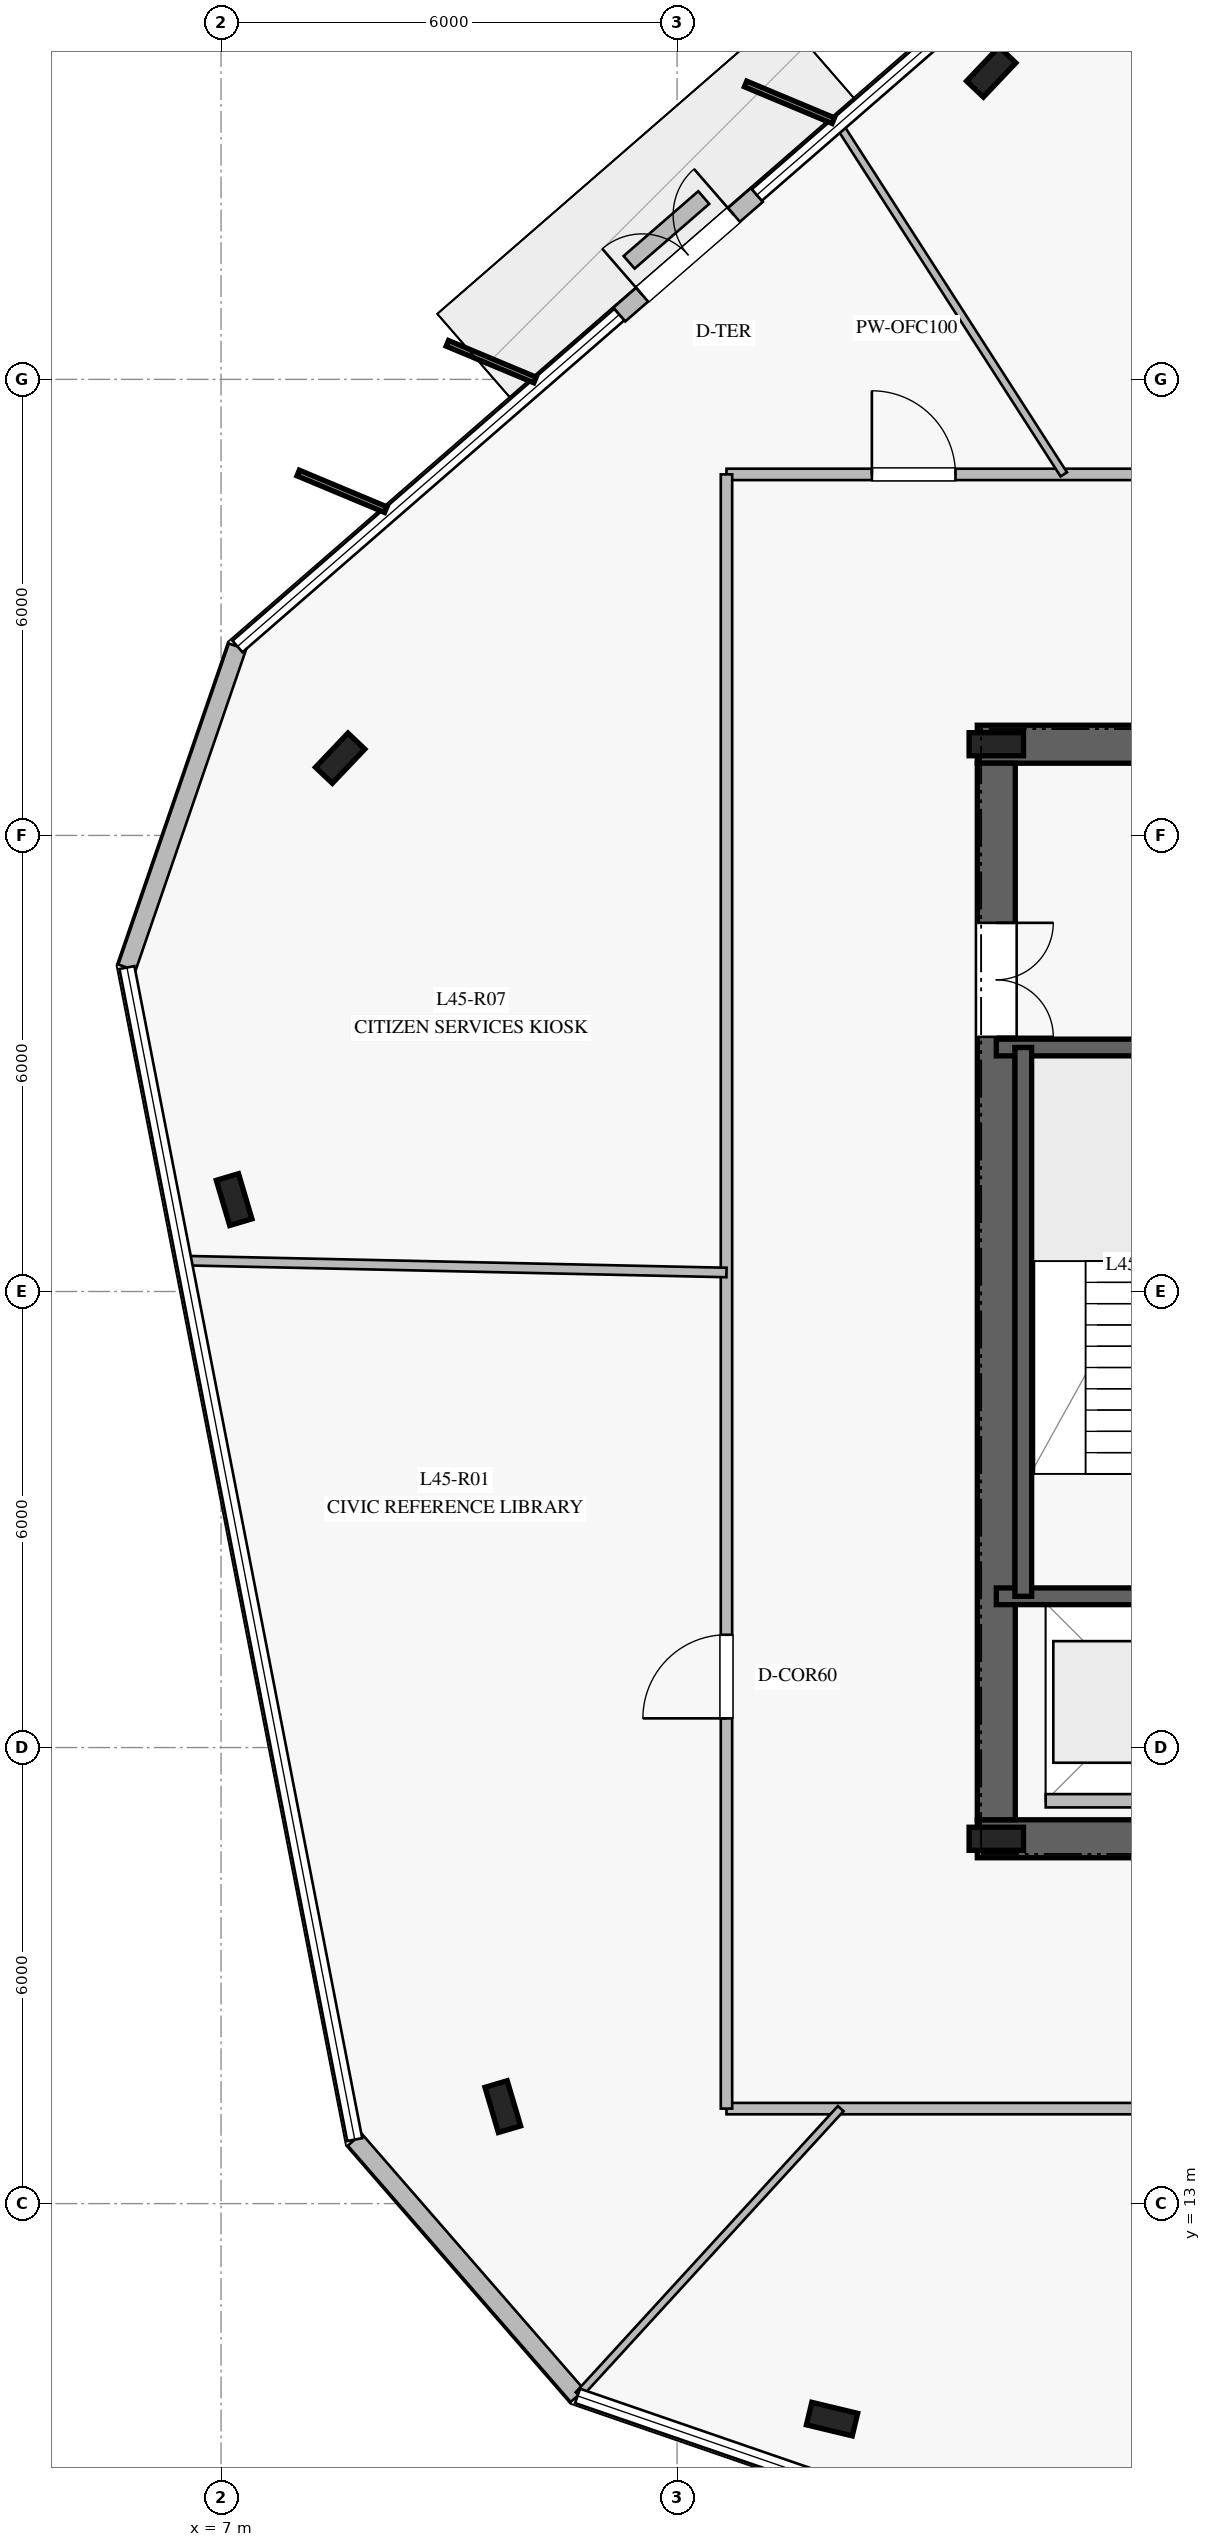
"""IFC4 building model, lengths in metres.
Left out: names, types, materials, properties, quantities, classifications, styles, units other than length and angle.
Written with IfcOpenShell. Run it as: python <this file> out.ifc"""

import sys

from ifc_helpers import new_model, si_unit, direction, frame, frame_2d, origin, origin_2d, place, context, subcontext, project, spatial, rectangle, i_section, extrude, element, fill, save


model = new_model("IFC4")
c1 = context("Model", 3, precision=1e-05, world=origin(), true_north=direction((0.0, 1.0)))
c2 = subcontext(c1, "Body", "Model", "MODEL_VIEW")
j1 = project(units=[si_unit("LENGTHUNIT", "METRE"), si_unit("PLANEANGLEUNIT", "RADIAN")], contexts=[c1])
p1 = place(None, origin())
s1 = spatial("IfcSite", under=j1, at=p1, CompositionType="ELEMENT")
p2 = place(p1, origin())
s2 = spatial("IfcBuilding", under=s1, at=p2, CompositionType="ELEMENT")
p3 = place(p2, frame((0.0, 0.0, 188.8)))
s3 = spatial("IfcBuildingStorey", under=s2, at=p3, CompositionType="ELEMENT", Elevation=188.8)
p4 = place(p3, frame((16.95, 17.8, 0.0), z_axis=(0.0, 0.0, 1.0), x_axis=(1.0, 0.0, 0.0)))
e1 = element("IfcWall", 1, at=p4, inside=s3, PredefinedType="SHEAR", context=c2, shape_type="SweptSolid", body=[
    extrude(rectangle(XDim=16.1, YDim=0.5, at=frame_2d((8.05, 0.0))), origin(), (0.0, 0.0, 1.0), 3.78),
])
p5 = place(p4, frame((5.0, 0.0, 0.0)))
e2 = element("IfcOpeningElement", 2, at=p5, cuts=e1, PredefinedType="OPENING", context=c2, shape_type="SweptSolid", body=[
    extrude(rectangle(XDim=1.2, YDim=2.25, at=frame_2d((0.6, 1.125))), frame((0.0, 0.26, 0.0), z_axis=(0.0, -1.0, 0.0), x_axis=(1.0, 0.0, 0.0)), (0.0, 0.0, 1.0), 0.52),
])
p6 = place(p4, frame((10.9, 0.0, 0.0)))
e3 = element("IfcOpeningElement", 3, at=p6, cuts=e1, PredefinedType="OPENING", context=c2, shape_type="SweptSolid", body=[
    extrude(rectangle(XDim=1.1, YDim=2.2, at=frame_2d((0.55, 1.1))), frame((0.0, 0.26, 0.0), z_axis=(0.0, -1.0, 0.0), x_axis=(1.0, 0.0, 0.0)), (0.0, 0.0, 1.0), 0.52),
])
p7 = place(p3, frame((33.05, 32.2, 0.0), z_axis=(0.0, 0.0, 1.0), x_axis=(-1.0, 0.0, 0.0)))
e4 = element("IfcWall", 4, at=p7, inside=s3, PredefinedType="SHEAR", context=c2, shape_type="SweptSolid", body=[
    extrude(rectangle(XDim=16.1, YDim=0.5, at=frame_2d((8.05, 0.0))), origin(), (0.0, 0.0, 1.0), 3.78),
])
p8 = place(p7, frame((5.0, 0.0, 0.0)))
e5 = element("IfcOpeningElement", 5, at=p8, cuts=e4, PredefinedType="OPENING", context=c2, shape_type="SweptSolid", body=[
    extrude(rectangle(XDim=1.2, YDim=2.25, at=frame_2d((0.6, 1.125))), frame((0.0, 0.26, 0.0), z_axis=(0.0, -1.0, 0.0), x_axis=(1.0, 0.0, 0.0)), (0.0, 0.0, 1.0), 0.52),
])
p9 = place(p7, frame((9.825, 0.0, 0.0)))
e6 = element("IfcOpeningElement", 6, at=p9, cuts=e4, PredefinedType="OPENING", context=c2, shape_type="SweptSolid", body=[
    extrude(rectangle(XDim=1.1, YDim=2.2, at=frame_2d((0.55, 1.1))), frame((0.0, 0.26, 0.0), z_axis=(0.0, -1.0, 0.0), x_axis=(1.0, 0.0, 0.0)), (0.0, 0.0, 1.0), 0.52),
])
p10 = place(p3, frame((17.2, 31.95, 0.0), z_axis=(0.0, 0.0, 1.0), x_axis=(0.0, -1.0, 0.0)))
e7 = element("IfcWall", 7, at=p10, inside=s3, PredefinedType="SHEAR", context=c2, shape_type="SweptSolid", body=[
    extrude(rectangle(XDim=13.9, YDim=0.5, at=frame_2d((6.95, 0.0))), origin(), (0.0, 0.0, 1.0), 3.78),
])
p11 = place(p10, frame((2.1, 0.0, 0.0)))
e8 = element("IfcOpeningElement", 8, at=p11, cuts=e7, PredefinedType="OPENING", context=c2, shape_type="SweptSolid", body=[
    extrude(rectangle(XDim=1.5, YDim=2.2, at=frame_2d((0.75, 1.1))), frame((0.0, 0.26, 0.0), z_axis=(0.0, -1.0, 0.0), x_axis=(1.0, 0.0, 0.0)), (0.0, 0.0, 1.0), 0.52),
])
for number, where, z_axis, x_axis in (
    (9, (17.2, 17.8, 0.0), (0.0, 0.0, 1.0), (1.0, 0.0, 0.0)),
    (10, (17.2, 32.2, 0.0), (0.0, 0.0, 1.0), (1.0, 0.0, 0.0)),
):
    element("IfcColumn", number, at=place(p3, frame(where, z_axis=z_axis, x_axis=x_axis)), inside=s3, PredefinedType="COLUMN", context=c2, shape_type="SweptSolid", body=[
        extrude(i_section(OverallWidth=0.304, OverallDepth=0.716, WebThickness=0.021, FlangeThickness=0.04, at=origin_2d()), origin(), (0.0, 0.0, 1.0), 4.0),
    ])
for number, where, z_axis, x_axis in (
    (11, (17.2, 20.99, 0.0), (0.0, 0.0, 1.0), (1.0, 0.0, 0.0)),
    (12, (17.2, 28.21, 0.0), (0.0, 0.0, 1.0), (1.0, 0.0, 0.0)),
):
    element("IfcWall", number, at=place(p3, frame(where, z_axis=z_axis, x_axis=x_axis)), inside=s3, PredefinedType="SOLIDWALL", context=c2, shape_type="SweptSolid", body=[
        extrude(rectangle(XDim=3.72, YDim=0.22, at=frame_2d((1.86, 0.0))), origin(), (0.0, 0.0, 1.0), 3.78),
    ])
p12 = place(p3, frame((17.555, 28.21, 0.0), z_axis=(0.0, 0.0, 1.0), x_axis=(0.0, -1.0, 0.0)))
e13 = element("IfcWall", 13, at=p12, inside=s3, PredefinedType="SOLIDWALL", context=c2, shape_type="SweptSolid", body=[
    extrude(rectangle(XDim=7.22, YDim=0.22, at=frame_2d((3.61, 0.0))), origin(), (0.0, 0.0, 1.0), 3.78),
])
for number, where, z_axis, x_axis in (
    (14, (17.133, 41.044, 0.0), (0.0, 0.0, 1.0), (0.688, 0.725, 0.0)),
    (15, (8.567, 32.016, 0.0), (0.0, 0.0, 1.0), (0.688, 0.725, 0.0)),
    (16, (7.172, 26.209, 0.0), (0.0, 0.0, 1.0), (-0.284, 0.959, 0.0)),
    (17, (10.707, 14.276, 0.0), (0.0, 0.0, 1.0), (-0.284, 0.959, 0.0)),
    (18, (15.039, 10.165, 0.0), (0.0, 0.0, 1.0), (-0.972, 0.233, 0.0)),
):
    element("IfcColumn", number, at=place(p3, frame(where, z_axis=z_axis, x_axis=x_axis)), inside=s3, PredefinedType="COLUMN", context=c2, shape_type="SweptSolid", body=[
        extrude(i_section(OverallWidth=0.305, OverallDepth=0.62, WebThickness=0.021, FlangeThickness=0.04, at=origin_2d()), origin(), (0.0, 0.0, 1.0), 4.0),
    ])
p13 = place(p3, frame((14.05, 39.426, 0.0), z_axis=(0.0, 0.0, 1.0), x_axis=(-0.754778546913, -0.655979683466, 0.0)))
e19 = element("IfcWall", 19, at=p13, inside=s3, PredefinedType="STANDARD", context=c2, shape_type="SweptSolid", body=[
    extrude(rectangle(XDim=2.399, YDim=0.24, at=frame_2d((1.2, 0.0))), origin(), (0.0, 0.0, 1.0), 3.78),
])
p14 = place(p13, frame((0.4, 0.0, 0.0)))
e20 = element("IfcOpeningElement", 20, at=p14, cuts=e19, PredefinedType="OPENING", context=c2, shape_type="SweptSolid", body=[
    extrude(rectangle(XDim=1.6, YDim=2.25, at=frame_2d((0.8, 1.125))), frame((0.0, 0.13, 0.0), z_axis=(0.0, -1.0, 0.0), x_axis=(1.0, 0.0, 0.0)), (0.0, 0.0, 1.0), 0.26),
])
p15 = place(p3, frame((7.216, 33.486, 0.0), z_axis=(0.0, 0.0, 1.0), x_axis=(-0.325492114227, -0.94554475493, 0.0)))
e21 = element("IfcWall", 21, at=p15, inside=s3, PredefinedType="STANDARD", context=c2, shape_type="SweptSolid", body=[
    extrude(rectangle(XDim=4.467, YDim=0.24, at=frame_2d((2.234, 0.0))), origin(), (0.0, 0.0, 1.0), 3.78),
])
p16 = place(p3, frame((8.759, 13.842, 0.0), z_axis=(0.0, 0.0, 1.0), x_axis=(0.656134075049, -0.754644337128, 0.0)))
e22 = element("IfcWall", 22, at=p16, inside=s3, PredefinedType="STANDARD", context=c2, shape_type="SweptSolid", body=[
    extrude(rectangle(XDim=4.469, YDim=0.24, at=frame_2d((2.234, 0.0))), origin(), (0.0, 0.0, 1.0), 3.78),
])
p17 = place(p3, frame((13.351, 39.392, 0.0), z_axis=(0.0, 0.0, 1.0), x_axis=(-0.75537303729, -0.655295028621, 0.0)))
e23 = element("IfcWall", 23, at=p17, inside=s3, PredefinedType="USERDEFINED", context=c2, shape_type="SweptSolid", body=[
    extrude(rectangle(XDim=1.3, YDim=0.22, at=frame_2d((0.65, 0.0))), origin(), (0.0, 0.0, 1.0), 0.4),
])
p18 = place(p3, frame((17.85, 18.3, 0.0), z_axis=(0.0, 0.0, 1.0), x_axis=(1.0, 0.0, 0.0)))
e24 = element("IfcWall", 24, at=p18, inside=s3, PredefinedType="PARTITIONING", context=c2, shape_type="SweptSolid", body=[
    extrude(rectangle(XDim=2.6, YDim=0.175, at=frame_2d((1.3, 0.0))), origin(), (0.0, 0.0, 1.0), 3.78),
])
p19 = place(p3, frame((13.65, 35.75, 0.0), z_axis=(0.0, 0.0, 1.0), x_axis=(1.0, 0.0, 0.0)))
e25 = element("IfcWall", 25, at=p19, inside=s3, PredefinedType="PARTITIONING", context=c2, shape_type="SweptSolid", body=[
    extrude(rectangle(XDim=22.7, YDim=0.15, at=frame_2d((11.35, 0.0))), origin(), (0.0, 0.0, 1.0), 3.05),
])
p20 = place(p19, frame((18.244, 0.0, 0.0)))
e26 = element("IfcOpeningElement", 26, at=p20, cuts=e25, PredefinedType="OPENING", context=c2, shape_type="SweptSolid", body=[
    extrude(rectangle(XDim=1.1, YDim=2.2, at=frame_2d((0.55, 1.1))), frame((0.0, 0.085, 0.0), z_axis=(0.0, -1.0, 0.0), x_axis=(1.0, 0.0, 0.0)), (0.0, 0.0, 1.0), 0.17),
])
p21 = place(p19, frame((9.18, 0.0, 0.0)))
e27 = element("IfcOpeningElement", 27, at=p21, cuts=e25, PredefinedType="OPENING", context=c2, shape_type="SweptSolid", body=[
    extrude(rectangle(XDim=1.1, YDim=2.2, at=frame_2d((0.55, 1.1))), frame((0.0, 0.085, 0.0), z_axis=(0.0, -1.0, 0.0), x_axis=(1.0, 0.0, 0.0)), (0.0, 0.0, 1.0), 0.17),
])
p22 = place(p19, frame((1.913, 0.0, 0.0)))
e28 = element("IfcOpeningElement", 28, at=p22, cuts=e25, PredefinedType="OPENING", context=c2, shape_type="SweptSolid", body=[
    extrude(rectangle(XDim=1.1, YDim=2.2, at=frame_2d((0.55, 1.1))), frame((0.0, 0.085, 0.0), z_axis=(0.0, -1.0, 0.0), x_axis=(1.0, 0.0, 0.0)), (0.0, 0.0, 1.0), 0.17),
])
p23 = place(p3, frame((36.35, 14.25, 0.0), z_axis=(0.0, 0.0, 1.0), x_axis=(-1.0, 0.0, 0.0)))
e29 = element("IfcWall", 29, at=p23, inside=s3, PredefinedType="PARTITIONING", context=c2, shape_type="SweptSolid", body=[
    extrude(rectangle(XDim=22.7, YDim=0.15, at=frame_2d((11.35, 0.0))), origin(), (0.0, 0.0, 1.0), 3.02),
])
p24 = place(p23, frame((13.972, 0.0, 0.0)))
e30 = element("IfcOpeningElement", 30, at=p24, cuts=e29, PredefinedType="OPENING", context=c2, shape_type="SweptSolid", body=[
    extrude(rectangle(XDim=1.1, YDim=2.2, at=frame_2d((0.55, 1.1))), frame((0.0, 0.085, 0.0), z_axis=(0.0, -1.0, 0.0), x_axis=(1.0, 0.0, 0.0)), (0.0, 0.0, 1.0), 0.17),
])
p25 = place(p3, frame((13.65, 14.25, 0.0), z_axis=(0.0, 0.0, 1.0), x_axis=(0.0, 1.0, 0.0)))
e31 = element("IfcWall", 31, at=p25, inside=s3, PredefinedType="PARTITIONING", context=c2, shape_type="SweptSolid", body=[
    extrude(rectangle(XDim=21.5, YDim=0.15, at=frame_2d((10.75, 0.0))), origin(), (0.0, 0.0, 1.0), 3.28),
])
p26 = place(p25, frame((5.134, 0.0, 0.0)))
e32 = element("IfcOpeningElement", 32, at=p26, cuts=e31, PredefinedType="OPENING", context=c2, shape_type="SweptSolid", body=[
    extrude(rectangle(XDim=1.1, YDim=2.2, at=frame_2d((0.55, 1.1))), frame((0.0, 0.085, 0.0), z_axis=(0.0, -1.0, 0.0), x_axis=(1.0, 0.0, 0.0)), (0.0, 0.0, 1.0), 0.17),
])
p27 = place(p3, frame((18.088, 35.75, 0.0), z_axis=(0.0, 0.0, 1.0), x_axis=(-0.540795982474, 0.841153794107, 0.0)))
e33 = element("IfcWall", 33, at=p27, inside=s3, PredefinedType="MOVABLE", context=c2, shape_type="SweptSolid", body=[
    extrude(rectangle(XDim=5.464, YDim=0.1, at=frame_2d((2.732, 0.0))), origin(), (0.0, 0.0, 1.0), 3.18),
])
p28 = place(p3, frame((13.65, 25.25, 0.0), z_axis=(0.0, 0.0, 1.0), x_axis=(-0.999760164854, 0.021900063259, 0.0)))
e34 = element("IfcWall", 34, at=p28, inside=s3, PredefinedType="PARTITIONING", context=c2, shape_type="SweptSolid", body=[
    extrude(rectangle(XDim=7.124, YDim=0.125, at=frame_2d((3.562, 0.0))), origin(), (0.0, 0.0, 1.0), 3.18),
])
p29 = place(p3, frame((15.153, 14.25, 0.0), z_axis=(0.0, 0.0, 1.0), x_axis=(-0.675503818213, -0.737356488803, 0.0)))
e35 = element("IfcWall", 35, at=p29, inside=s3, PredefinedType="MOVABLE", context=c2, shape_type="SweptSolid", body=[
    extrude(rectangle(XDim=5.108, YDim=0.1, at=frame_2d((2.554, 0.0))), origin(), (0.0, 0.0, 1.0), 3.18),
])
p30 = place(p14, frame((1.6, 0.0, 0.0), z_axis=(0.0, 0.0, 1.0), x_axis=(-1.0, 0.0, 0.0)))
e36 = element("IfcDoor", 36, at=p30, inside=s3, OperationType="DOUBLE_DOOR_SINGLE_SWING", PredefinedType="DOOR", context=c2, shape_type="SweptSolid", body=[
    extrude(rectangle(XDim=1.6, YDim=2.25, at=frame_2d((0.8, 1.125))), frame((0.0, 0.025, 0.0), z_axis=(0.0, -1.0, 0.0), x_axis=(1.0, 0.0, 0.0)), (0.0, 0.0, 1.0), 0.05),
])
fill(e20, e36)
p31 = place(p11, origin())
e37 = element("IfcDoor", 37, at=p31, inside=s3, OperationType="DOUBLE_DOOR_SINGLE_SWING", PredefinedType="DOOR", context=c2, shape_type="SweptSolid", body=[
    extrude(rectangle(XDim=1.5, YDim=2.2, at=frame_2d((0.75, 1.1))), frame((0.0, 0.025, 0.0), z_axis=(0.0, -1.0, 0.0), x_axis=(1.0, 0.0, 0.0)), (0.0, 0.0, 1.0), 0.05),
])
fill(e8, e37)
p32 = place(p26, origin())
e38 = element("IfcDoor", 38, at=p32, inside=s3, OperationType="SINGLE_SWING_LEFT", PredefinedType="DOOR", context=c2, shape_type="SweptSolid", body=[
    extrude(rectangle(XDim=1.1, YDim=2.2, at=frame_2d((0.55, 1.1))), frame((0.0, 0.025, 0.0), z_axis=(0.0, -1.0, 0.0), x_axis=(1.0, 0.0, 0.0)), (0.0, 0.0, 1.0), 0.05),
])
fill(e32, e38)
p33 = place(p22, origin())
e39 = element("IfcDoor", 39, at=p33, inside=s3, OperationType="SINGLE_SWING_LEFT", PredefinedType="DOOR", context=c2, shape_type="SweptSolid", body=[
    extrude(rectangle(XDim=1.1, YDim=2.2, at=frame_2d((0.55, 1.1))), frame((0.0, 0.025, 0.0), z_axis=(0.0, -1.0, 0.0), x_axis=(1.0, 0.0, 0.0)), (0.0, 0.0, 1.0), 0.05),
])
fill(e28, e39)
save(model, sys.argv[1])
